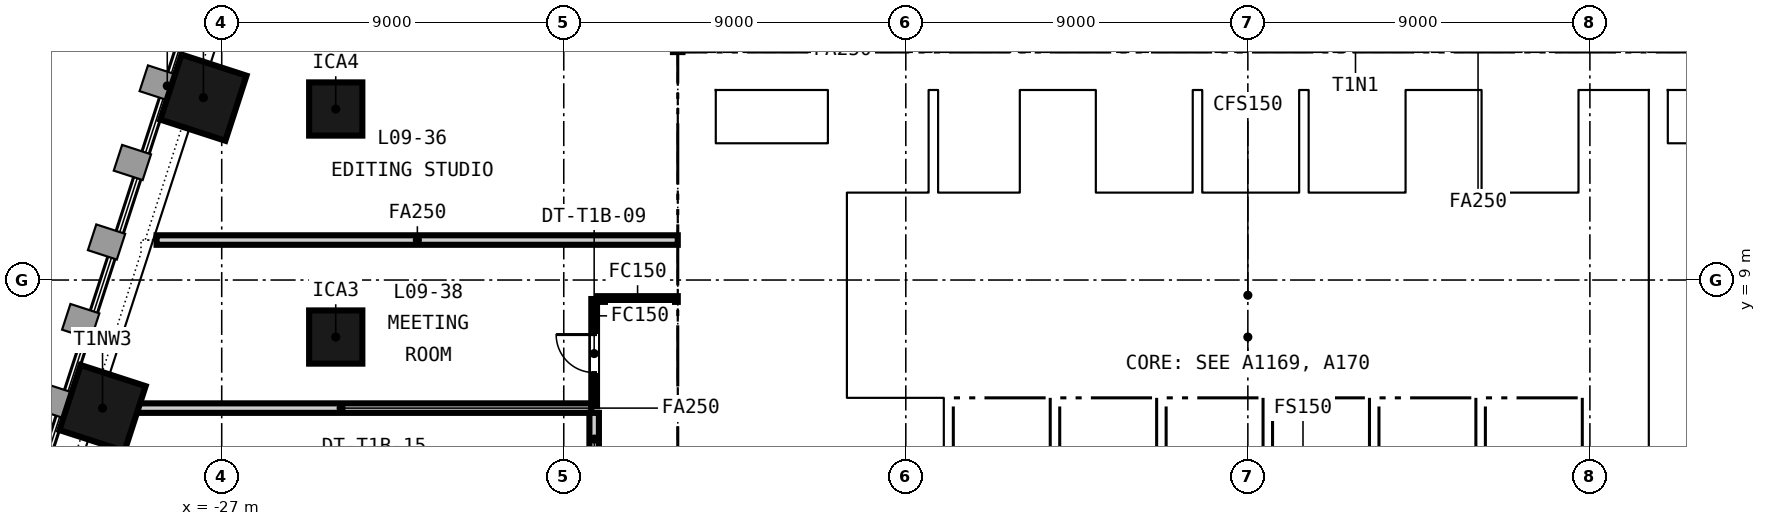
"""IFC4 building model, lengths in metres.
Left out: names, types, materials, properties, quantities, classifications, styles, units other than length and angle.
Written with IfcOpenShell. Run it as: python <this file> out.ifc"""

import sys

from ifc_helpers import new_model, si_unit, direction, frame, frame_2d, origin, origin_2d, place, context, subcontext, project, spatial, rectangle, extrude, element, fill, save


model = new_model("IFC4")
c1 = context("Model", 3, precision=1e-05, world=origin(), true_north=direction((0.0, 1.0)))
c2 = subcontext(c1, "Body", "Model", "MODEL_VIEW")
j1 = project(units=[si_unit("LENGTHUNIT", "METRE"), si_unit("PLANEANGLEUNIT", "RADIAN")], contexts=[c1])
p1 = place(None, origin())
s1 = spatial("IfcSite", under=j1, at=p1, CompositionType="ELEMENT")
p2 = place(p1, origin())
s2 = spatial("IfcBuilding", under=s1, at=p2, CompositionType="ELEMENT")
p3 = place(p2, frame((0.0, 0.0, 46.95)))
s3 = spatial("IfcBuildingStorey", under=s2, at=p3, CompositionType="ELEMENT", Elevation=46.95)
p4 = place(p3, frame((-15.0, 14.5, -0.15), z_axis=(0.0, 0.0, 1.0), x_axis=(1.0, 0.0, 0.0)))
e1 = element("IfcWall", 1, at=p4, inside=s3, PredefinedType="SOLIDWALL", context=c2, shape_type="SweptSolid", body=[
    extrude(rectangle(XDim=30.0, YDim=1.0, at=frame_2d((15.0, 0.0))), origin(), (0.0, 0.0, 1.0), 3.65),
])
p5 = place(p4, frame((9.25, 0.0, 0.15)))
e2 = element("IfcOpeningElement", 2, at=p5, cuts=e1, PredefinedType="OPENING", context=c2, shape_type="SweptSolid", body=[
    extrude(rectangle(XDim=1.5, YDim=2.1, at=frame_2d((0.75, 1.05))), frame((0.0, 0.51, 0.0), z_axis=(0.0, -1.0, 0.0), x_axis=(1.0, 0.0, 0.0)), (0.0, 0.0, 1.0), 1.02),
])
p6 = place(p4, frame((19.4, 0.0, 0.15)))
e3 = element("IfcOpeningElement", 3, at=p6, cuts=e1, PredefinedType="OPENING", context=c2, shape_type="SweptSolid", body=[
    extrude(rectangle(XDim=1.5, YDim=2.1, at=frame_2d((0.75, 1.05))), frame((0.0, 0.51, 0.0), z_axis=(0.0, -1.0, 0.0), x_axis=(1.0, 0.0, 0.0)), (0.0, 0.0, 1.0), 1.02),
])
p7 = place(p4, frame((1.5, 0.0, 0.15)))
e4 = element("IfcOpeningElement", 4, at=p7, cuts=e1, PredefinedType="OPENING", context=c2, shape_type="SweptSolid", body=[
    extrude(rectangle(XDim=1.2, YDim=2.1, at=frame_2d((0.6, 1.05))), frame((0.0, 0.51, 0.0), z_axis=(0.0, -1.0, 0.0), x_axis=(1.0, 0.0, 0.0)), (0.0, 0.0, 1.0), 1.02),
])
p8 = place(p4, frame((27.3, 0.0, 0.15)))
e5 = element("IfcOpeningElement", 5, at=p8, cuts=e1, PredefinedType="OPENING", context=c2, shape_type="SweptSolid", body=[
    extrude(rectangle(XDim=1.2, YDim=2.1, at=frame_2d((0.6, 1.05))), frame((0.0, 0.51, 0.0), z_axis=(0.0, -1.0, 0.0), x_axis=(1.0, 0.0, 0.0)), (0.0, 0.0, 1.0), 1.02),
])
p9 = place(p3, frame((-14.5, 1.0, -0.15), z_axis=(0.0, 0.0, 1.0), x_axis=(0.0, 1.0, 0.0)))
e6 = element("IfcWall", 6, at=p9, inside=s3, PredefinedType="SOLIDWALL", context=c2, shape_type="SweptSolid", body=[
    extrude(rectangle(XDim=13.0, YDim=1.0, at=frame_2d((6.5, 0.0))), origin(), (0.0, 0.0, 1.0), 3.65),
])
for number, where, z_axis, x_axis in (
    (7, (-10.8, 1.0, -0.15), (0.0, 0.0, 1.0), (0.0, 1.0, 0.0)),
    (8, (10.8, 1.0, -0.15), (0.0, 0.0, 1.0), (0.0, 1.0, 0.0)),
):
    element("IfcWall", number, at=place(p3, frame(where, z_axis=z_axis, x_axis=x_axis)), inside=s3, PredefinedType="SOLIDWALL", context=c2, shape_type="SweptSolid", body=[
        extrude(rectangle(XDim=13.0, YDim=0.5, at=frame_2d((6.5, 0.0))), origin(), (0.0, 0.0, 1.0), 3.65),
    ])
for number, where, z_axis, x_axis in (
    (9, (-27.482, 13.799, -0.15), (0.0, 0.0, 1.0), (-0.309, -0.951, 0.0)),
    (10, (-30.136, 5.63, -0.15), (0.0, 0.0, 1.0), (-0.309, -0.951, 0.0)),
):
    element("IfcColumn", number, at=place(p3, frame(where, z_axis=z_axis, x_axis=x_axis)), inside=s3, PredefinedType="COLUMN", context=c2, shape_type="SweptSolid", body=[
        extrude(rectangle(XDim=1.8, YDim=1.8, at=origin_2d()), origin(), (0.0, 0.0, 1.0), 3.65),
    ])
for number, where, z_axis, x_axis in (
    (11, (-24.0, 7.5, -0.15), (0.0, 0.0, 1.0), (1.0, 0.0, 0.0)),
    (12, (-24.0, 13.5, -0.15), (0.0, 0.0, 1.0), (1.0, 0.0, 0.0)),
):
    element("IfcColumn", number, at=place(p3, frame(where, z_axis=z_axis, x_axis=x_axis)), inside=s3, PredefinedType="COLUMN", context=c2, shape_type="SweptSolid", body=[
        extrude(rectangle(XDim=1.4, YDim=1.4, at=origin_2d()), origin(), (0.0, 0.0, 1.0), 3.65),
    ])
p10 = place(p3, frame((-10.55, 6.025, 0.0), z_axis=(0.0, 0.0, 1.0), x_axis=(1.0, 0.0, 0.0)))
e13 = element("IfcWall", 13, at=p10, inside=s3, PredefinedType="PARTITIONING", context=c2, shape_type="SweptSolid", body=[
    extrude(rectangle(XDim=21.1, YDim=0.25, at=frame_2d((10.55, 0.0))), origin(), (0.0, 0.0, 1.0), 3.5),
])
p11 = place(p3, frame((-4.125, 8.55, 0.0), z_axis=(0.0, 0.0, 1.0), x_axis=(1.0, 0.0, 0.0)))
e14 = element("IfcWall", 14, at=p11, inside=s3, PredefinedType="PARTITIONING", context=c2, shape_type="SweptSolid", body=[
    extrude(rectangle(XDim=14.675, YDim=0.2, at=frame_2d((7.337, 0.0))), origin(), (0.0, 0.0, 1.0), 3.5),
])
p12 = place(p11, frame((2.438, 0.0, 0.0)))
e15 = element("IfcOpeningElement", 15, at=p12, cuts=e14, PredefinedType="OPENING", context=c2, shape_type="SweptSolid", body=[
    extrude(rectangle(XDim=1.0, YDim=2.1, at=frame_2d((0.5, 1.05))), frame((0.0, 0.11, 0.0), z_axis=(0.0, -1.0, 0.0), x_axis=(1.0, 0.0, 0.0)), (0.0, 0.0, 1.0), 0.22),
])
p13 = place(p11, frame((6.775, 0.0, 0.0)))
e16 = element("IfcOpeningElement", 16, at=p13, cuts=e14, PredefinedType="OPENING", context=c2, shape_type="SweptSolid", body=[
    extrude(rectangle(XDim=1.0, YDim=2.1, at=frame_2d((0.5, 1.05))), frame((0.0, 0.11, 0.0), z_axis=(0.0, -1.0, 0.0), x_axis=(1.0, 0.0, 0.0)), (0.0, 0.0, 1.0), 0.22),
])
p14 = place(p11, frame((10.363, 0.0, 0.0)))
e17 = element("IfcOpeningElement", 17, at=p14, cuts=e14, PredefinedType="OPENING", context=c2, shape_type="SweptSolid", body=[
    extrude(rectangle(XDim=1.0, YDim=2.1, at=frame_2d((0.5, 1.05))), frame((0.0, 0.11, 0.0), z_axis=(0.0, -1.0, 0.0), x_axis=(1.0, 0.0, 0.0)), (0.0, 0.0, 1.0), 0.22),
])
p15 = place(p11, frame((13.475, 0.0, 0.0)))
e18 = element("IfcOpeningElement", 18, at=p15, cuts=e14, PredefinedType="OPENING", context=c2, shape_type="SweptSolid", body=[
    extrude(rectangle(XDim=0.9, YDim=2.1, at=frame_2d((0.45, 1.05))), frame((0.0, 0.11, 0.0), z_axis=(0.0, -1.0, 0.0), x_axis=(1.0, 0.0, 0.0)), (0.0, 0.0, 1.0), 0.22),
])
p16 = place(p3, frame((-10.55, 11.2, 0.0), z_axis=(0.0, 0.0, 1.0), x_axis=(1.0, 0.0, 0.0)))
e19 = element("IfcWall", 19, at=p16, inside=s3, PredefinedType="PARTITIONING", context=c2, shape_type="SweptSolid", body=[
    extrude(rectangle(XDim=4.8, YDim=0.2, at=frame_2d((2.4, 0.0))), origin(), (0.0, 0.0, 1.0), 3.5),
])
p17 = place(p16, frame((0.525, 0.0, 0.0)))
e20 = element("IfcOpeningElement", 20, at=p17, cuts=e19, PredefinedType="OPENING", context=c2, shape_type="SweptSolid", body=[
    extrude(rectangle(XDim=1.1, YDim=2.1, at=frame_2d((0.55, 1.05))), frame((0.0, 0.11, 0.0), z_axis=(0.0, -1.0, 0.0), x_axis=(1.0, 0.0, 0.0)), (0.0, 0.0, 1.0), 0.22),
])
p18 = place(p16, frame((2.925, 0.0, 0.0)))
e21 = element("IfcOpeningElement", 21, at=p18, cuts=e19, PredefinedType="OPENING", context=c2, shape_type="SweptSolid", body=[
    extrude(rectangle(XDim=1.1, YDim=2.1, at=frame_2d((0.55, 1.05))), frame((0.0, 0.11, 0.0), z_axis=(0.0, -1.0, 0.0), x_axis=(1.0, 0.0, 0.0)), (0.0, 0.0, 1.0), 0.22),
])
p19 = place(p3, frame((-4.25, 11.2, 0.0), z_axis=(0.0, 0.0, 1.0), x_axis=(1.0, 0.0, 0.0)))
e22 = element("IfcWall", 22, at=p19, inside=s3, PredefinedType="PARTITIONING", context=c2, shape_type="SweptSolid", body=[
    extrude(rectangle(XDim=8.65, YDim=0.2, at=frame_2d((4.325, 0.0))), origin(), (0.0, 0.0, 1.0), 3.5),
])
p20 = place(p19, frame((0.825, 0.0, 0.0)))
e23 = element("IfcOpeningElement", 23, at=p20, cuts=e22, PredefinedType="OPENING", context=c2, shape_type="SweptSolid", body=[
    extrude(rectangle(XDim=1.4, YDim=2.1, at=frame_2d((0.7, 1.05))), frame((0.0, 0.11, 0.0), z_axis=(0.0, -1.0, 0.0), x_axis=(1.0, 0.0, 0.0)), (0.0, 0.0, 1.0), 0.22),
])
p21 = place(p19, frame((3.625, 0.0, 0.0)))
e24 = element("IfcOpeningElement", 24, at=p21, cuts=e22, PredefinedType="OPENING", context=c2, shape_type="SweptSolid", body=[
    extrude(rectangle(XDim=1.4, YDim=2.1, at=frame_2d((0.7, 1.05))), frame((0.0, 0.11, 0.0), z_axis=(0.0, -1.0, 0.0), x_axis=(1.0, 0.0, 0.0)), (0.0, 0.0, 1.0), 0.22),
])
p22 = place(p3, frame((5.9, 11.2, 0.0), z_axis=(0.0, 0.0, 1.0), x_axis=(1.0, 0.0, 0.0)))
e25 = element("IfcWall", 25, at=p22, inside=s3, PredefinedType="PARTITIONING", context=c2, shape_type="SweptSolid", body=[
    extrude(rectangle(XDim=4.65, YDim=0.2, at=frame_2d((2.325, 0.0))), origin(), (0.0, 0.0, 1.0), 3.5),
])
p23 = place(p22, frame((3.4, 0.0, 0.0)))
e26 = element("IfcOpeningElement", 26, at=p23, cuts=e25, PredefinedType="OPENING", context=c2, shape_type="SweptSolid", body=[
    extrude(rectangle(XDim=0.9, YDim=2.1, at=frame_2d((0.45, 1.05))), frame((0.0, 0.11, 0.0), z_axis=(0.0, -1.0, 0.0), x_axis=(1.0, 0.0, 0.0)), (0.0, 0.0, 1.0), 0.22),
])
p24 = place(p3, frame((-4.125, 6.15, 0.0), z_axis=(0.0, 0.0, 1.0), x_axis=(0.0, 1.0, 0.0)))
e27 = element("IfcWall", 27, at=p24, inside=s3, PredefinedType="PARTITIONING", context=c2, shape_type="SweptSolid", body=[
    extrude(rectangle(XDim=4.95, YDim=0.25, at=frame_2d((2.475, 0.0))), origin(), (0.0, 0.0, 1.0), 3.5),
])
p25 = place(p24, frame((3.125, 0.0, 0.0)))
e28 = element("IfcOpeningElement", 28, at=p25, cuts=e27, PredefinedType="OPENING", context=c2, shape_type="SweptSolid", body=[
    extrude(rectangle(XDim=1.2, YDim=2.1, at=frame_2d((0.6, 1.05))), frame((0.0, 0.135, 0.0), z_axis=(0.0, -1.0, 0.0), x_axis=(1.0, 0.0, 0.0)), (0.0, 0.0, 1.0), 0.27),
])
for number, where, z_axis, x_axis in (
    (29, (-7.875, 3.6, 0.0), (0.0, 0.0, 1.0), (0.0, 1.0, 0.0)),
    (30, (-5.075, 3.6, 0.0), (0.0, 0.0, 1.0), (0.0, 1.0, 0.0)),
    (31, (-2.275, 3.6, 0.0), (0.0, 0.0, 1.0), (0.0, 1.0, 0.0)),
    (32, (0.525, 3.6, 0.0), (0.0, 0.0, 1.0), (0.0, 1.0, 0.0)),
    (33, (3.325, 3.6, 0.0), (0.0, 0.0, 1.0), (0.0, 1.0, 0.0)),
    (34, (6.125, 3.6, 0.0), (0.0, 0.0, 1.0), (0.0, 1.0, 0.0)),
    (35, (8.925, 3.6, 0.0), (0.0, 0.0, 1.0), (0.0, 1.0, 0.0)),
):
    element("IfcWall", number, at=place(p3, frame(where, z_axis=z_axis, x_axis=x_axis)), inside=s3, PredefinedType="PARTITIONING", context=c2, shape_type="SweptSolid", body=[
        extrude(rectangle(XDim=2.3, YDim=0.25, at=frame_2d((1.15, 0.0))), origin(), (0.0, 0.0, 1.0), 3.5),
    ])
for number, where, z_axis, x_axis in (
    (36, (1.7, 6.15, 0.0), (0.0, 0.0, 1.0), (0.0, 1.0, 0.0)),
    (37, (4.6, 6.15, 0.0), (0.0, 0.0, 1.0), (0.0, 1.0, 0.0)),
):
    element("IfcWall", number, at=place(p3, frame(where, z_axis=z_axis, x_axis=x_axis)), inside=s3, PredefinedType="PARTITIONING", context=c2, shape_type="SweptSolid", body=[
        extrude(rectangle(XDim=2.3, YDim=0.15, at=frame_2d((1.15, 0.0))), origin(), (0.0, 0.0, 1.0), 3.5),
    ])
p26 = place(p3, frame((8.925, 6.15, 0.0), z_axis=(0.0, 0.0, 1.0), x_axis=(0.0, 1.0, 0.0)))
e38 = element("IfcWall", 38, at=p26, inside=s3, PredefinedType="PARTITIONING", context=c2, shape_type="SweptSolid", body=[
    extrude(rectangle(XDim=2.3, YDim=0.25, at=frame_2d((1.15, 0.0))), origin(), (0.0, 0.0, 1.0), 3.5),
])
for number, where, z_axis, x_axis in (
    (39, (-8.275, 11.3, 0.0), (0.0, 0.0, 1.0), (0.0, 1.0, 0.0)),
    (40, (-5.875, 11.3, 0.0), (0.0, 0.0, 1.0), (0.0, 1.0, 0.0)),
    (41, (-4.125, 11.3, 0.0), (0.0, 0.0, 1.0), (0.0, 1.0, 0.0)),
    (42, (-1.325, 11.3, 0.0), (0.0, 0.0, 1.0), (0.0, 1.0, 0.0)),
    (43, (1.475, 11.3, 0.0), (0.0, 0.0, 1.0), (0.0, 1.0, 0.0)),
    (44, (4.275, 11.3, 0.0), (0.0, 0.0, 1.0), (0.0, 1.0, 0.0)),
    (45, (6.025, 11.3, 0.0), (0.0, 0.0, 1.0), (0.0, 1.0, 0.0)),
    (46, (8.825, 11.3, 0.0), (0.0, 0.0, 1.0), (0.0, 1.0, 0.0)),
):
    element("IfcWall", number, at=place(p3, frame(where, z_axis=z_axis, x_axis=x_axis)), inside=s3, PredefinedType="PARTITIONING", context=c2, shape_type="SweptSolid", body=[
        extrude(rectangle(XDim=2.7, YDim=0.25, at=frame_2d((1.35, 0.0))), origin(), (0.0, 0.0, 1.0), 3.5),
    ])
for number, where, z_axis, x_axis in (
    (47, (-14.0, 7.35, -0.15), (0.0, 0.0, 1.0), (1.0, 0.0, 0.0)),
    (48, (11.05, 7.35, -0.15), (0.0, 0.0, 1.0), (1.0, 0.0, 0.0)),
):
    element("IfcWall", number, at=place(p3, frame(where, z_axis=z_axis, x_axis=x_axis)), inside=s3, PredefinedType="SOLIDWALL", context=c2, shape_type="SweptSolid", body=[
        extrude(rectangle(XDim=2.95, YDim=0.3, at=frame_2d((1.475, 0.0))), origin(), (0.0, 0.0, 1.0), 3.65),
    ])
p27 = place(p3, frame((-15.002, 14.998, 0.0), z_axis=(0.0, 0.0, 1.0), x_axis=(0.000708152429, 0.99999974926, 0.0)))
e49 = element("IfcWall", 49, at=p27, inside=s3, PredefinedType="PARTITIONING", context=c2, shape_type="SweptSolid", body=[
    extrude(rectangle(XDim=2.758, YDim=0.25, at=frame_2d((1.379, 0.0))), origin(), (0.0, 0.0, 1.0), 2.741),
])
p28 = place(p27, frame((0.479, 0.0, 0.0)))
e50 = element("IfcOpeningElement", 50, at=p28, cuts=e49, PredefinedType="OPENING", context=c2, shape_type="SweptSolid", body=[
    extrude(rectangle(XDim=1.8, YDim=2.1, at=frame_2d((0.9, 1.05))), frame((0.0, 0.135, 0.0), z_axis=(0.0, -1.0, 0.0), x_axis=(1.0, 0.0, 0.0)), (0.0, 0.0, 1.0), 0.27),
])
p29 = place(p3, frame((-28.714, 10.052, 0.0), z_axis=(0.0, 0.0, 1.0), x_axis=(1.0, 0.0, 0.0)))
e51 = element("IfcWall", 51, at=p29, inside=s3, PredefinedType="PARTITIONING", context=c2, shape_type="SweptSolid", body=[
    extrude(rectangle(XDim=13.714, YDim=0.25, at=frame_2d((6.857, 0.0))), origin(), (0.0, 0.0, 1.0), 2.741),
])
p30 = place(p3, frame((-17.2, 5.68, 0.0), z_axis=(0.0, 0.0, 1.0), x_axis=(0.0, 1.0, 0.0)))
e52 = element("IfcWall", 52, at=p30, inside=s3, PredefinedType="PARTITIONING", context=c2, shape_type="SweptSolid", body=[
    extrude(rectangle(XDim=2.82, YDim=0.15, at=frame_2d((1.41, 0.0))), origin(), (0.0, 0.0, 1.0), 2.741),
])
p31 = place(p30, frame((0.885, 0.0, 0.0)))
e53 = element("IfcOpeningElement", 53, at=p31, cuts=e52, PredefinedType="OPENING", context=c2, shape_type="SweptSolid", body=[
    extrude(rectangle(XDim=1.0, YDim=2.1, at=frame_2d((0.5, 1.05))), frame((0.0, 0.085, 0.0), z_axis=(0.0, -1.0, 0.0), x_axis=(1.0, 0.0, 0.0)), (0.0, 0.0, 1.0), 0.17),
])
p32 = place(p3, frame((-17.125, 8.5, 0.0), z_axis=(0.0, 0.0, 1.0), x_axis=(1.0, 0.0, 0.0)))
e54 = element("IfcWall", 54, at=p32, inside=s3, PredefinedType="PARTITIONING", context=c2, shape_type="SweptSolid", body=[
    extrude(rectangle(XDim=2.125, YDim=0.15, at=frame_2d((1.062, 0.0))), origin(), (0.0, 0.0, 1.0), 2.741),
])
p33 = place(p3, frame((-30.451, 5.63, 0.0), z_axis=(0.0, 0.0, 1.0), x_axis=(1.0, 0.0, 0.0)))
e55 = element("IfcWall", 55, at=p33, inside=s3, PredefinedType="PARTITIONING", context=c2, shape_type="SweptSolid", body=[
    extrude(rectangle(XDim=13.176, YDim=0.25, at=frame_2d((6.588, 0.0))), origin(), (0.0, 0.0, 1.0), 2.741),
])
p34 = place(p3, frame((-17.2, 4.125, 0.0), z_axis=(0.0, 0.0, 1.0), x_axis=(0.0, 1.0, 0.0)))
e56 = element("IfcWall", 56, at=p34, inside=s3, PredefinedType="PARTITIONING", context=c2, shape_type="SweptSolid", body=[
    extrude(rectangle(XDim=1.38, YDim=0.25, at=frame_2d((0.69, 0.0))), origin(), (0.0, 0.0, 1.0), 2.741),
])
p35 = place(p25, origin())
e57 = element("IfcDoor", 57, at=p35, inside=s3, OperationType="SINGLE_SWING_LEFT", PredefinedType="DOOR", context=c2, shape_type="SweptSolid", body=[
    extrude(rectangle(XDim=1.2, YDim=2.1, at=frame_2d((0.6, 1.05))), frame((0.0, 0.025, 0.0), z_axis=(0.0, -1.0, 0.0), x_axis=(1.0, 0.0, 0.0)), (0.0, 0.0, 1.0), 0.05),
])
fill(e28, e57)
p36 = place(p12, origin())
e58 = element("IfcDoor", 58, at=p36, inside=s3, OperationType="SINGLE_SWING_LEFT", PredefinedType="DOOR", context=c2, shape_type="SweptSolid", body=[
    extrude(rectangle(XDim=1.0, YDim=2.1, at=frame_2d((0.5, 1.05))), frame((0.0, 0.025, 0.0), z_axis=(0.0, -1.0, 0.0), x_axis=(1.0, 0.0, 0.0)), (0.0, 0.0, 1.0), 0.05),
])
fill(e15, e58)
p37 = place(p13, origin())
e59 = element("IfcDoor", 59, at=p37, inside=s3, OperationType="SINGLE_SWING_RIGHT", PredefinedType="DOOR", context=c2, shape_type="SweptSolid", body=[
    extrude(rectangle(XDim=1.0, YDim=2.1, at=frame_2d((0.5, 1.05))), frame((0.0, 0.025, 0.0), z_axis=(0.0, -1.0, 0.0), x_axis=(1.0, 0.0, 0.0)), (0.0, 0.0, 1.0), 0.05),
])
fill(e16, e59)
p38 = place(p14, origin())
e60 = element("IfcDoor", 60, at=p38, inside=s3, OperationType="SINGLE_SWING_LEFT", PredefinedType="DOOR", context=c2, shape_type="SweptSolid", body=[
    extrude(rectangle(XDim=1.0, YDim=2.1, at=frame_2d((0.5, 1.05))), frame((0.0, 0.025, 0.0), z_axis=(0.0, -1.0, 0.0), x_axis=(1.0, 0.0, 0.0)), (0.0, 0.0, 1.0), 0.05),
])
fill(e17, e60)
p39 = place(p15, origin())
e61 = element("IfcDoor", 61, at=p39, inside=s3, OperationType="SINGLE_SWING_RIGHT", PredefinedType="DOOR", context=c2, shape_type="SweptSolid", body=[
    extrude(rectangle(XDim=0.9, YDim=2.1, at=frame_2d((0.45, 1.05))), frame((0.0, 0.025, 0.0), z_axis=(0.0, -1.0, 0.0), x_axis=(1.0, 0.0, 0.0)), (0.0, 0.0, 1.0), 0.05),
])
fill(e18, e61)
p40 = place(p17, origin())
e62 = element("IfcDoor", 62, at=p40, inside=s3, OperationType="DOUBLE_DOOR_SLIDING", PredefinedType="DOOR", context=c2, shape_type="SweptSolid", body=[
    extrude(rectangle(XDim=1.1, YDim=2.1, at=frame_2d((0.55, 1.05))), frame((0.0, 0.025, 0.0), z_axis=(0.0, -1.0, 0.0), x_axis=(1.0, 0.0, 0.0)), (0.0, 0.0, 1.0), 0.05),
])
fill(e20, e62)
p41 = place(p18, origin())
e63 = element("IfcDoor", 63, at=p41, inside=s3, OperationType="DOUBLE_DOOR_SLIDING", PredefinedType="DOOR", context=c2, shape_type="SweptSolid", body=[
    extrude(rectangle(XDim=1.1, YDim=2.1, at=frame_2d((0.55, 1.05))), frame((0.0, 0.025, 0.0), z_axis=(0.0, -1.0, 0.0), x_axis=(1.0, 0.0, 0.0)), (0.0, 0.0, 1.0), 0.05),
])
fill(e21, e63)
p42 = place(p20, origin())
e64 = element("IfcDoor", 64, at=p42, inside=s3, OperationType="DOUBLE_DOOR_SLIDING", PredefinedType="DOOR", context=c2, shape_type="SweptSolid", body=[
    extrude(rectangle(XDim=1.4, YDim=2.1, at=frame_2d((0.7, 1.05))), frame((0.0, 0.025, 0.0), z_axis=(0.0, -1.0, 0.0), x_axis=(1.0, 0.0, 0.0)), (0.0, 0.0, 1.0), 0.05),
])
fill(e23, e64)
p43 = place(p21, origin())
e65 = element("IfcDoor", 65, at=p43, inside=s3, OperationType="DOUBLE_DOOR_SLIDING", PredefinedType="DOOR", context=c2, shape_type="SweptSolid", body=[
    extrude(rectangle(XDim=1.4, YDim=2.1, at=frame_2d((0.7, 1.05))), frame((0.0, 0.025, 0.0), z_axis=(0.0, -1.0, 0.0), x_axis=(1.0, 0.0, 0.0)), (0.0, 0.0, 1.0), 0.05),
])
fill(e24, e65)
p44 = place(p23, origin())
e66 = element("IfcDoor", 66, at=p44, inside=s3, OperationType="SINGLE_SWING_LEFT", PredefinedType="DOOR", context=c2, shape_type="SweptSolid", body=[
    extrude(rectangle(XDim=0.9, YDim=2.1, at=frame_2d((0.45, 1.05))), frame((0.0, 0.025, 0.0), z_axis=(0.0, -1.0, 0.0), x_axis=(1.0, 0.0, 0.0)), (0.0, 0.0, 1.0), 0.05),
])
fill(e26, e66)
p45 = place(p5, origin())
e67 = element("IfcDoor", 67, at=p45, inside=s3, OperationType="DOUBLE_DOOR_SINGLE_SWING", PredefinedType="DOOR", context=c2, shape_type="SweptSolid", body=[
    extrude(rectangle(XDim=1.5, YDim=2.1, at=frame_2d((0.75, 1.05))), frame((0.0, 0.025, 0.0), z_axis=(0.0, -1.0, 0.0), x_axis=(1.0, 0.0, 0.0)), (0.0, 0.0, 1.0), 0.05),
])
fill(e2, e67)
p46 = place(p6, origin())
e68 = element("IfcDoor", 68, at=p46, inside=s3, OperationType="DOUBLE_DOOR_SINGLE_SWING", PredefinedType="DOOR", context=c2, shape_type="SweptSolid", body=[
    extrude(rectangle(XDim=1.5, YDim=2.1, at=frame_2d((0.75, 1.05))), frame((0.0, 0.025, 0.0), z_axis=(0.0, -1.0, 0.0), x_axis=(1.0, 0.0, 0.0)), (0.0, 0.0, 1.0), 0.05),
])
fill(e3, e68)
p47 = place(p7, origin())
e69 = element("IfcDoor", 69, at=p47, inside=s3, OperationType="SINGLE_SWING_RIGHT", PredefinedType="DOOR", context=c2, shape_type="SweptSolid", body=[
    extrude(rectangle(XDim=1.2, YDim=2.1, at=frame_2d((0.6, 1.05))), frame((0.0, 0.025, 0.0), z_axis=(0.0, -1.0, 0.0), x_axis=(1.0, 0.0, 0.0)), (0.0, 0.0, 1.0), 0.05),
])
fill(e4, e69)
p48 = place(p31, origin())
e70 = element("IfcDoor", 70, at=p48, inside=s3, OperationType="SINGLE_SWING_RIGHT", PredefinedType="DOOR", context=c2, shape_type="SweptSolid", body=[
    extrude(rectangle(XDim=1.0, YDim=2.1, at=frame_2d((0.5, 1.05))), frame((0.0, 0.025, 0.0), z_axis=(0.0, -1.0, 0.0), x_axis=(1.0, 0.0, 0.0)), (0.0, 0.0, 1.0), 0.05),
])
fill(e53, e70)
save(model, sys.argv[1])
